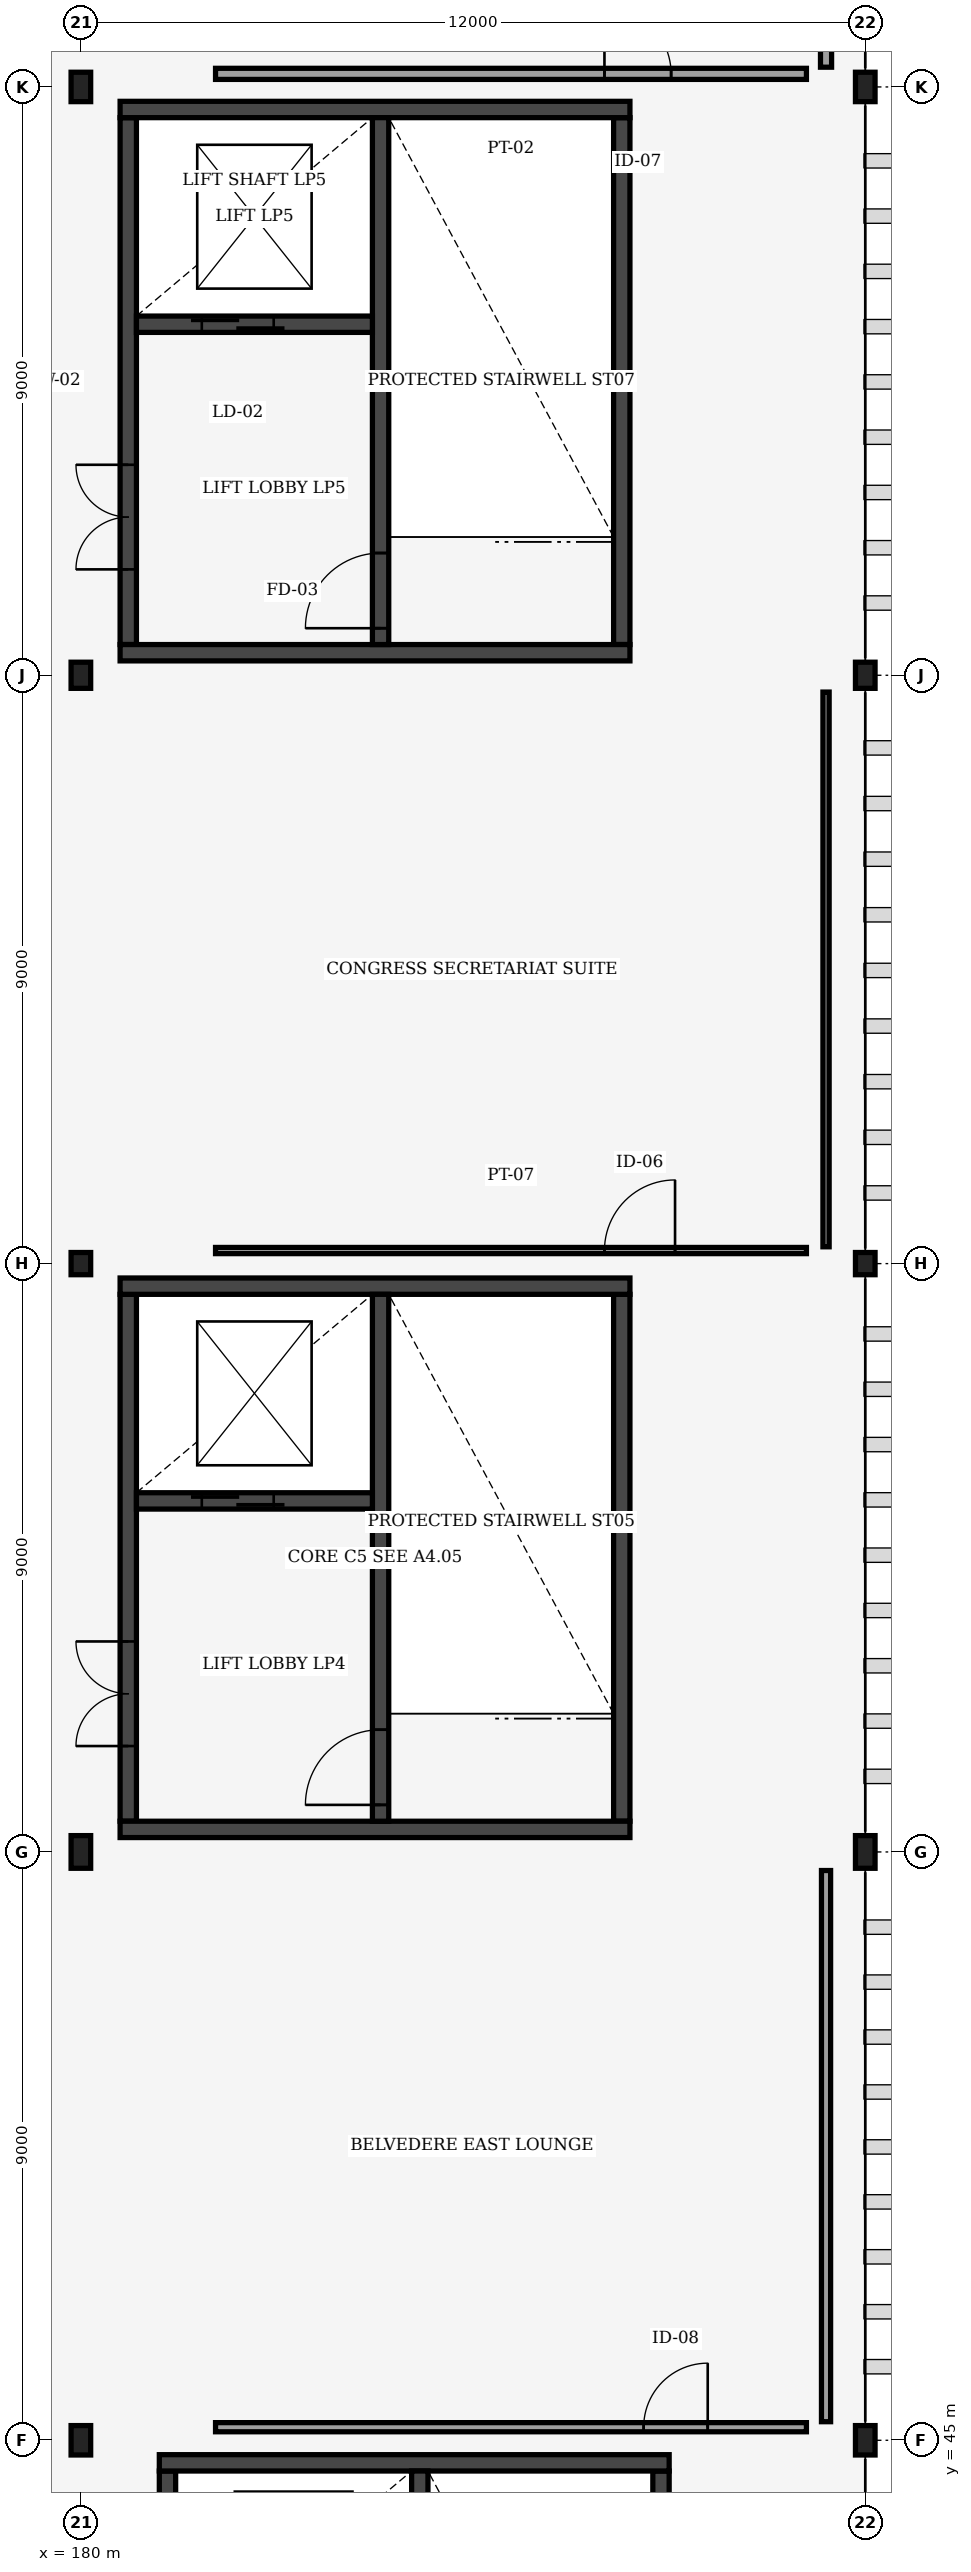
"""IFC4 building model, lengths in metres.
Left out: names, types, materials, properties, quantities, classifications, styles, units other than length and angle.
Written with IfcOpenShell. Run it as: python <this file> out.ifc"""

import sys

from ifc_helpers import new_model, si_unit, direction, frame, frame_2d, origin, origin_2d, place, context, subcontext, project, spatial, rectangle, i_section, extrude, element, fill, save


model = new_model("IFC4")
c1 = context("Model", 3, precision=1e-05, world=origin(), true_north=direction((0.0, 1.0)))
c2 = subcontext(c1, "Body", "Model", "MODEL_VIEW")
j1 = project(units=[si_unit("LENGTHUNIT", "METRE"), si_unit("PLANEANGLEUNIT", "RADIAN")], contexts=[c1])
p1 = place(None, origin())
s1 = spatial("IfcSite", under=j1, at=p1, CompositionType="ELEMENT")
p2 = place(p1, origin())
s2 = spatial("IfcBuilding", under=s1, at=p2, CompositionType="ELEMENT")
p3 = place(p2, frame((0.0, 0.0, 26.8)))
s3 = spatial("IfcBuildingStorey", under=s2, at=p3, CompositionType="ELEMENT", Elevation=26.8)
p4 = place(p3, frame((180.0, 45.0, 0.0), z_axis=(0.0, 0.0, 1.0), x_axis=(1.0, 0.0, 0.0)))
e1 = element("IfcColumn", 1, at=p4, inside=s3, PredefinedType="COLUMN", context=c2, shape_type="SweptSolid", body=[
    extrude(i_section(OverallWidth=0.3, OverallDepth=0.45, WebThickness=0.014, FlangeThickness=0.026, FilletRadius=0.027, at=origin_2d()), origin(), (0.0, 0.0, 1.0), 3.0),
])
p5 = place(p3, frame((180.0, 54.0, 0.0), z_axis=(0.0, 0.0, 1.0), x_axis=(1.0, 0.0, 0.0)))
e2 = element("IfcColumn", 2, at=p5, inside=s3, PredefinedType="COLUMN", context=c2, shape_type="SweptSolid", body=[
    extrude(i_section(OverallWidth=0.3, OverallDepth=0.5, WebThickness=0.014, FlangeThickness=0.028, FilletRadius=0.027, at=origin_2d()), origin(), (0.0, 0.0, 1.0), 3.0),
])
p6 = place(p3, frame((180.0, 63.0, 0.0), z_axis=(0.0, 0.0, 1.0), x_axis=(1.0, 0.0, 0.0)))
e3 = element("IfcColumn", 3, at=p6, inside=s3, PredefinedType="COLUMN", context=c2, shape_type="SweptSolid", body=[
    extrude(i_section(OverallWidth=0.3, OverallDepth=0.34, WebThickness=0.012, FlangeThickness=0.021, FilletRadius=0.027, at=origin_2d()), origin(), (0.0, 0.0, 1.0), 3.0),
])
p7 = place(p3, frame((180.0, 72.0, 0.0), z_axis=(0.0, 0.0, 1.0), x_axis=(1.0, 0.0, 0.0)))
e4 = element("IfcColumn", 4, at=p7, inside=s3, PredefinedType="COLUMN", context=c2, shape_type="SweptSolid", body=[
    extrude(i_section(OverallWidth=0.3, OverallDepth=0.4, WebThickness=0.013, FlangeThickness=0.024, FilletRadius=0.027, at=origin_2d()), origin(), (0.0, 0.0, 1.0), 3.0),
])
for number, where, z_axis, x_axis in (
    (5, (180.0, 81.0, 0.0), (0.0, 0.0, 1.0), (1.0, 0.0, 0.0)),
    (6, (192.0, 45.0, 0.0), (0.0, 0.0, 1.0), (1.0, 0.0, 0.0)),
):
    element("IfcColumn", number, at=place(p3, frame(where, z_axis=z_axis, x_axis=x_axis)), inside=s3, PredefinedType="COLUMN", context=c2, shape_type="SweptSolid", body=[
        extrude(i_section(OverallWidth=0.3, OverallDepth=0.45, WebThickness=0.014, FlangeThickness=0.026, FilletRadius=0.027, at=origin_2d()), origin(), (0.0, 0.0, 1.0), 3.0),
    ])
p8 = place(p3, frame((192.0, 54.0, 0.0), z_axis=(0.0, 0.0, 1.0), x_axis=(1.0, 0.0, 0.0)))
e7 = element("IfcColumn", 7, at=p8, inside=s3, PredefinedType="COLUMN", context=c2, shape_type="SweptSolid", body=[
    extrude(i_section(OverallWidth=0.3, OverallDepth=0.5, WebThickness=0.014, FlangeThickness=0.028, FilletRadius=0.027, at=origin_2d()), origin(), (0.0, 0.0, 1.0), 3.0),
])
p9 = place(p3, frame((192.0, 63.0, 0.0), z_axis=(0.0, 0.0, 1.0), x_axis=(1.0, 0.0, 0.0)))
e8 = element("IfcColumn", 8, at=p9, inside=s3, PredefinedType="COLUMN", context=c2, shape_type="SweptSolid", body=[
    extrude(i_section(OverallWidth=0.3, OverallDepth=0.34, WebThickness=0.012, FlangeThickness=0.021, FilletRadius=0.027, at=origin_2d()), origin(), (0.0, 0.0, 1.0), 3.0),
])
p10 = place(p3, frame((192.0, 72.0, 0.0), z_axis=(0.0, 0.0, 1.0), x_axis=(1.0, 0.0, 0.0)))
e9 = element("IfcColumn", 9, at=p10, inside=s3, PredefinedType="COLUMN", context=c2, shape_type="SweptSolid", body=[
    extrude(i_section(OverallWidth=0.3, OverallDepth=0.4, WebThickness=0.013, FlangeThickness=0.024, FilletRadius=0.027, at=origin_2d()), origin(), (0.0, 0.0, 1.0), 3.0),
])
p11 = place(p3, frame((192.0, 81.0, 0.0), z_axis=(0.0, 0.0, 1.0), x_axis=(1.0, 0.0, 0.0)))
e10 = element("IfcColumn", 10, at=p11, inside=s3, PredefinedType="COLUMN", context=c2, shape_type="SweptSolid", body=[
    extrude(i_section(OverallWidth=0.3, OverallDepth=0.45, WebThickness=0.014, FlangeThickness=0.026, FilletRadius=0.027, at=origin_2d()), origin(), (0.0, 0.0, 1.0), 3.0),
])
p12 = place(p3, frame((180.725, 54.47, 0.0), z_axis=(0.0, 0.0, 1.0), x_axis=(0.0, 1.0, 0.0)))
e11 = element("IfcWall", 11, at=p12, inside=s3, PredefinedType="SHEAR", context=c2, shape_type="SweptSolid", body=[
    extrude(rectangle(XDim=8.06, YDim=0.25, at=frame_2d((4.03, 0.0))), origin(), (0.0, 0.0, 1.0), 2.64),
])
p13 = place(p12, frame((1.15, 0.0, 0.0)))
e12 = element("IfcOpeningElement", 12, at=p13, cuts=e11, PredefinedType="OPENING", context=c2, shape_type="SweptSolid", body=[
    extrude(rectangle(XDim=1.6, YDim=2.2, at=frame_2d((0.8, 1.1))), frame((0.0, 0.135, 0.0), z_axis=(0.0, -1.0, 0.0), x_axis=(1.0, 0.0, 0.0)), (0.0, 0.0, 1.0), 0.27),
])
p14 = place(p3, frame((188.275, 54.47, 0.0), z_axis=(0.0, 0.0, 1.0), x_axis=(0.0, 1.0, 0.0)))
e13 = element("IfcWall", 13, at=p14, inside=s3, PredefinedType="SHEAR", context=c2, shape_type="SweptSolid", body=[
    extrude(rectangle(XDim=8.06, YDim=0.25, at=frame_2d((4.03, 0.0))), origin(), (0.0, 0.0, 1.0), 2.64),
])
for number, where, z_axis, x_axis in (
    (14, (180.6, 54.345, 0.0), (0.0, 0.0, 1.0), (1.0, 0.0, 0.0)),
    (15, (180.6, 62.655, 0.0), (0.0, 0.0, 1.0), (1.0, 0.0, 0.0)),
):
    element("IfcWall", number, at=place(p3, frame(where, z_axis=z_axis, x_axis=x_axis)), inside=s3, PredefinedType="SHEAR", context=c2, shape_type="SweptSolid", body=[
        extrude(rectangle(XDim=7.8, YDim=0.25, at=frame_2d((3.9, 0.0))), origin(), (0.0, 0.0, 1.0), 2.64),
    ])
p15 = place(p3, frame((184.585, 54.47, 0.0), z_axis=(0.0, 0.0, 1.0), x_axis=(0.0, 1.0, 0.0)))
e16 = element("IfcWall", 16, at=p15, inside=s3, PredefinedType="SHEAR", context=c2, shape_type="SweptSolid", body=[
    extrude(rectangle(XDim=8.06, YDim=0.25, at=frame_2d((4.03, 0.0))), origin(), (0.0, 0.0, 1.0), 2.64),
])
p16 = place(p15, frame((0.25, 0.0, 0.0)))
e17 = element("IfcOpeningElement", 17, at=p16, cuts=e16, PredefinedType="OPENING", context=c2, shape_type="SweptSolid", body=[
    extrude(rectangle(XDim=1.15, YDim=2.15, at=frame_2d((0.575, 1.075))), frame((0.0, 0.135, 0.0), z_axis=(0.0, -1.0, 0.0), x_axis=(1.0, 0.0, 0.0)), (0.0, 0.0, 1.0), 0.27),
])
p17 = place(p3, frame((180.85, 59.37, 0.0), z_axis=(0.0, 0.0, 1.0), x_axis=(1.0, 0.0, 0.0)))
e18 = element("IfcWall", 18, at=p17, inside=s3, PredefinedType="SHEAR", context=c2, shape_type="SweptSolid", body=[
    extrude(rectangle(XDim=3.61, YDim=0.25, at=frame_2d((1.805, 0.0))), origin(), (0.0, 0.0, 1.0), 2.64),
])
p18 = place(p17, frame((1.0, 0.0, 0.0)))
e19 = element("IfcOpeningElement", 19, at=p18, cuts=e18, PredefinedType="OPENING", context=c2, shape_type="SweptSolid", body=[
    extrude(rectangle(XDim=1.1, YDim=2.1, at=frame_2d((0.55, 1.05))), frame((0.0, 0.135, 0.0), z_axis=(0.0, -1.0, 0.0), x_axis=(1.0, 0.0, 0.0)), (0.0, 0.0, 1.0), 0.27),
])
p19 = place(p3, frame((181.325, 36.47, 0.0), z_axis=(0.0, 0.0, 1.0), x_axis=(0.0, 1.0, 0.0)))
e20 = element("IfcWall", 20, at=p19, inside=s3, PredefinedType="SHEAR", context=c2, shape_type="SweptSolid", body=[
    extrude(rectangle(XDim=8.06, YDim=0.25, at=frame_2d((4.03, 0.0))), origin(), (0.0, 0.0, 1.0), 2.64),
])
p20 = place(p19, frame((1.15, 0.0, 0.0)))
e21 = element("IfcOpeningElement", 21, at=p20, cuts=e20, PredefinedType="OPENING", context=c2, shape_type="SweptSolid", body=[
    extrude(rectangle(XDim=1.8, YDim=2.2, at=frame_2d((0.9, 1.1))), frame((0.0, 0.135, 0.0), z_axis=(0.0, -1.0, 0.0), x_axis=(1.0, 0.0, 0.0)), (0.0, 0.0, 1.0), 0.27),
])
p21 = place(p3, frame((188.875, 36.47, 0.0), z_axis=(0.0, 0.0, 1.0), x_axis=(0.0, 1.0, 0.0)))
e22 = element("IfcWall", 22, at=p21, inside=s3, PredefinedType="SHEAR", context=c2, shape_type="SweptSolid", body=[
    extrude(rectangle(XDim=8.06, YDim=0.25, at=frame_2d((4.03, 0.0))), origin(), (0.0, 0.0, 1.0), 2.64),
])
p22 = place(p3, frame((181.2, 44.655, 0.0), z_axis=(0.0, 0.0, 1.0), x_axis=(1.0, 0.0, 0.0)))
e23 = element("IfcWall", 23, at=p22, inside=s3, PredefinedType="SHEAR", context=c2, shape_type="SweptSolid", body=[
    extrude(rectangle(XDim=7.8, YDim=0.25, at=frame_2d((3.9, 0.0))), origin(), (0.0, 0.0, 1.0), 2.64),
])
p23 = place(p3, frame((185.185, 36.47, 0.0), z_axis=(0.0, 0.0, 1.0), x_axis=(0.0, 1.0, 0.0)))
e24 = element("IfcWall", 24, at=p23, inside=s3, PredefinedType="SHEAR", context=c2, shape_type="SweptSolid", body=[
    extrude(rectangle(XDim=8.06, YDim=0.25, at=frame_2d((4.03, 0.0))), origin(), (0.0, 0.0, 1.0), 2.64),
])
p24 = place(p23, frame((0.25, 0.0, 0.0)))
e25 = element("IfcOpeningElement", 25, at=p24, cuts=e24, PredefinedType="OPENING", context=c2, shape_type="SweptSolid", body=[
    extrude(rectangle(XDim=1.15, YDim=2.15, at=frame_2d((0.575, 1.075))), frame((0.0, 0.135, 0.0), z_axis=(0.0, -1.0, 0.0), x_axis=(1.0, 0.0, 0.0)), (0.0, 0.0, 1.0), 0.27),
])
p25 = place(p3, frame((180.725, 72.47, 0.0), z_axis=(0.0, 0.0, 1.0), x_axis=(0.0, 1.0, 0.0)))
e26 = element("IfcWall", 26, at=p25, inside=s3, PredefinedType="SHEAR", context=c2, shape_type="SweptSolid", body=[
    extrude(rectangle(XDim=8.06, YDim=0.25, at=frame_2d((4.03, 0.0))), origin(), (0.0, 0.0, 1.0), 2.64),
])
p26 = place(p25, frame((1.15, 0.0, 0.0)))
e27 = element("IfcOpeningElement", 27, at=p26, cuts=e26, PredefinedType="OPENING", context=c2, shape_type="SweptSolid", body=[
    extrude(rectangle(XDim=1.6, YDim=2.2, at=frame_2d((0.8, 1.1))), frame((0.0, 0.135, 0.0), z_axis=(0.0, -1.0, 0.0), x_axis=(1.0, 0.0, 0.0)), (0.0, 0.0, 1.0), 0.27),
])
p27 = place(p3, frame((188.275, 72.47, 0.0), z_axis=(0.0, 0.0, 1.0), x_axis=(0.0, 1.0, 0.0)))
e28 = element("IfcWall", 28, at=p27, inside=s3, PredefinedType="SHEAR", context=c2, shape_type="SweptSolid", body=[
    extrude(rectangle(XDim=8.06, YDim=0.25, at=frame_2d((4.03, 0.0))), origin(), (0.0, 0.0, 1.0), 2.64),
])
for number, where, z_axis, x_axis in (
    (29, (180.6, 72.345, 0.0), (0.0, 0.0, 1.0), (1.0, 0.0, 0.0)),
    (30, (180.6, 80.655, 0.0), (0.0, 0.0, 1.0), (1.0, 0.0, 0.0)),
):
    element("IfcWall", number, at=place(p3, frame(where, z_axis=z_axis, x_axis=x_axis)), inside=s3, PredefinedType="SHEAR", context=c2, shape_type="SweptSolid", body=[
        extrude(rectangle(XDim=7.8, YDim=0.25, at=frame_2d((3.9, 0.0))), origin(), (0.0, 0.0, 1.0), 2.64),
    ])
p28 = place(p3, frame((184.585, 72.47, 0.0), z_axis=(0.0, 0.0, 1.0), x_axis=(0.0, 1.0, 0.0)))
e31 = element("IfcWall", 31, at=p28, inside=s3, PredefinedType="SHEAR", context=c2, shape_type="SweptSolid", body=[
    extrude(rectangle(XDim=8.06, YDim=0.25, at=frame_2d((4.03, 0.0))), origin(), (0.0, 0.0, 1.0), 2.64),
])
p29 = place(p28, frame((0.25, 0.0, 0.0)))
e32 = element("IfcOpeningElement", 32, at=p29, cuts=e31, PredefinedType="OPENING", context=c2, shape_type="SweptSolid", body=[
    extrude(rectangle(XDim=1.15, YDim=2.15, at=frame_2d((0.575, 1.075))), frame((0.0, 0.135, 0.0), z_axis=(0.0, -1.0, 0.0), x_axis=(1.0, 0.0, 0.0)), (0.0, 0.0, 1.0), 0.27),
])
p30 = place(p3, frame((180.85, 77.37, 0.0), z_axis=(0.0, 0.0, 1.0), x_axis=(1.0, 0.0, 0.0)))
e33 = element("IfcWall", 33, at=p30, inside=s3, PredefinedType="SHEAR", context=c2, shape_type="SweptSolid", body=[
    extrude(rectangle(XDim=3.61, YDim=0.25, at=frame_2d((1.805, 0.0))), origin(), (0.0, 0.0, 1.0), 2.64),
])
p31 = place(p30, frame((1.0, 0.0, 0.0)))
e34 = element("IfcOpeningElement", 34, at=p31, cuts=e33, PredefinedType="OPENING", context=c2, shape_type="SweptSolid", body=[
    extrude(rectangle(XDim=1.1, YDim=2.1, at=frame_2d((0.55, 1.05))), frame((0.0, 0.135, 0.0), z_axis=(0.0, -1.0, 0.0), x_axis=(1.0, 0.0, 0.0)), (0.0, 0.0, 1.0), 0.27),
])
p32 = place(p3, frame((182.06, 63.2, 0.0), z_axis=(0.0, 0.0, 1.0), x_axis=(1.0, 0.0, 0.0)))
e35 = element("IfcWall", 35, at=p32, inside=s3, PredefinedType="PARTITIONING", context=c2, shape_type="SweptSolid", body=[
    extrude(rectangle(XDim=9.04, YDim=0.095, at=frame_2d((4.52, 0.0))), origin(), (0.0, 0.0, 1.0), 2.35),
])
p33 = place(p32, frame((5.95, 0.0, 0.0)))
e36 = element("IfcOpeningElement", 36, at=p33, cuts=e35, PredefinedType="OPENING", context=c2, shape_type="SweptSolid", body=[
    extrude(rectangle(XDim=1.08, YDim=2.18, at=frame_2d((0.54, 1.09))), frame((0.0, 0.057, 0.0), z_axis=(0.0, -1.0, 0.0), x_axis=(1.0, 0.0, 0.0)), (0.0, 0.0, 1.0), 0.115),
])
p34 = place(p3, frame((191.4, 63.257, 0.0), z_axis=(0.0, 0.0, 1.0), x_axis=(0.0, 1.0, 0.0)))
e37 = element("IfcWall", 37, at=p34, inside=s3, PredefinedType="PARTITIONING", context=c2, shape_type="SweptSolid", body=[
    extrude(rectangle(XDim=8.486, YDim=0.095, at=frame_2d((4.243, 0.0))), origin(), (0.0, 0.0, 1.0), 2.35),
])
p35 = place(p3, frame((182.06, 81.2, 0.0), z_axis=(0.0, 0.0, 1.0), x_axis=(1.0, 0.0, 0.0)))
e38 = element("IfcWall", 38, at=p35, inside=s3, PredefinedType="PARTITIONING", context=c2, shape_type="SweptSolid", body=[
    extrude(rectangle(XDim=9.04, YDim=0.17, at=frame_2d((4.52, 0.0))), origin(), (0.0, 0.0, 1.0), 2.35),
])
p36 = place(p35, frame((5.95, 0.0, 0.0)))
e39 = element("IfcOpeningElement", 39, at=p36, cuts=e38, PredefinedType="OPENING", context=c2, shape_type="SweptSolid", body=[
    extrude(rectangle(XDim=1.02, YDim=2.15, at=frame_2d((0.51, 1.075))), frame((0.0, 0.095, 0.0), z_axis=(0.0, -1.0, 0.0), x_axis=(1.0, 0.0, 0.0)), (0.0, 0.0, 1.0), 0.19),
])
p37 = place(p3, frame((191.4, 81.302, 0.0), z_axis=(0.0, 0.0, 1.0), x_axis=(0.0, 1.0, 0.0)))
e40 = element("IfcWall", 40, at=p37, inside=s3, PredefinedType="PARTITIONING", context=c2, shape_type="SweptSolid", body=[
    extrude(rectangle(XDim=8.396, YDim=0.17, at=frame_2d((4.198, 0.0))), origin(), (0.0, 0.0, 1.0), 2.35),
])
p38 = place(p3, frame((182.06, 45.2, 0.0), z_axis=(0.0, 0.0, 1.0), x_axis=(1.0, 0.0, 0.0)))
e41 = element("IfcWall", 41, at=p38, inside=s3, PredefinedType="PARTITIONING", context=c2, shape_type="SweptSolid", body=[
    extrude(rectangle(XDim=9.04, YDim=0.14, at=frame_2d((4.52, 0.0))), origin(), (0.0, 0.0, 1.0), 2.35),
])
p39 = place(p38, frame((6.55, 0.0, 0.0)))
e42 = element("IfcOpeningElement", 42, at=p39, cuts=e41, PredefinedType="OPENING", context=c2, shape_type="SweptSolid", body=[
    extrude(rectangle(XDim=0.98, YDim=2.12, at=frame_2d((0.49, 1.06))), frame((0.0, 0.08, 0.0), z_axis=(0.0, -1.0, 0.0), x_axis=(1.0, 0.0, 0.0)), (0.0, 0.0, 1.0), 0.16),
])
p40 = place(p3, frame((191.4, 45.284, 0.0), z_axis=(0.0, 0.0, 1.0), x_axis=(0.0, 1.0, 0.0)))
e43 = element("IfcWall", 43, at=p40, inside=s3, PredefinedType="PARTITIONING", context=c2, shape_type="SweptSolid", body=[
    extrude(rectangle(XDim=8.432, YDim=0.14, at=frame_2d((4.216, 0.0))), origin(), (0.0, 0.0, 1.0), 2.35),
])
p41 = place(p16, origin())
e44 = element("IfcDoor", 44, at=p41, inside=s3, OperationType="SINGLE_SWING_LEFT", PredefinedType="DOOR", context=c2, shape_type="SweptSolid", body=[
    extrude(rectangle(XDim=1.15, YDim=2.15, at=frame_2d((0.575, 1.075))), frame((0.0, 0.025, 0.0), z_axis=(0.0, -1.0, 0.0), x_axis=(1.0, 0.0, 0.0)), (0.0, 0.0, 1.0), 0.05),
])
fill(e17, e44)
p42 = place(p18, origin())
e45 = element("IfcDoor", 45, at=p42, inside=s3, OperationType="DOUBLE_DOOR_SLIDING", PredefinedType="DOOR", context=c2, shape_type="SweptSolid", body=[
    extrude(rectangle(XDim=1.1, YDim=2.1, at=frame_2d((0.55, 1.05))), frame((0.0, 0.025, 0.0), z_axis=(0.0, -1.0, 0.0), x_axis=(1.0, 0.0, 0.0)), (0.0, 0.0, 1.0), 0.05),
])
fill(e19, e45)
p43 = place(p13, origin())
e46 = element("IfcDoor", 46, at=p43, inside=s3, OperationType="DOUBLE_DOOR_SINGLE_SWING", PredefinedType="DOOR", context=c2, shape_type="SweptSolid", body=[
    extrude(rectangle(XDim=1.6, YDim=2.2, at=frame_2d((0.8, 1.1))), frame((0.0, 0.025, 0.0), z_axis=(0.0, -1.0, 0.0), x_axis=(1.0, 0.0, 0.0)), (0.0, 0.0, 1.0), 0.05),
])
fill(e12, e46)
p44 = place(p29, origin())
e47 = element("IfcDoor", 47, at=p44, inside=s3, OperationType="SINGLE_SWING_LEFT", PredefinedType="DOOR", context=c2, shape_type="SweptSolid", body=[
    extrude(rectangle(XDim=1.15, YDim=2.15, at=frame_2d((0.575, 1.075))), frame((0.0, 0.025, 0.0), z_axis=(0.0, -1.0, 0.0), x_axis=(1.0, 0.0, 0.0)), (0.0, 0.0, 1.0), 0.05),
])
fill(e32, e47)
p45 = place(p31, origin())
e48 = element("IfcDoor", 48, at=p45, inside=s3, OperationType="DOUBLE_DOOR_SLIDING", PredefinedType="DOOR", context=c2, shape_type="SweptSolid", body=[
    extrude(rectangle(XDim=1.1, YDim=2.1, at=frame_2d((0.55, 1.05))), frame((0.0, 0.025, 0.0), z_axis=(0.0, -1.0, 0.0), x_axis=(1.0, 0.0, 0.0)), (0.0, 0.0, 1.0), 0.05),
])
fill(e34, e48)
p46 = place(p26, origin())
e49 = element("IfcDoor", 49, at=p46, inside=s3, OperationType="DOUBLE_DOOR_SINGLE_SWING", PredefinedType="DOOR", context=c2, shape_type="SweptSolid", body=[
    extrude(rectangle(XDim=1.6, YDim=2.2, at=frame_2d((0.8, 1.1))), frame((0.0, 0.025, 0.0), z_axis=(0.0, -1.0, 0.0), x_axis=(1.0, 0.0, 0.0)), (0.0, 0.0, 1.0), 0.05),
])
fill(e27, e49)
p47 = place(p33, origin())
e50 = element("IfcDoor", 50, at=p47, inside=s3, OperationType="SINGLE_SWING_RIGHT", PredefinedType="DOOR", context=c2, shape_type="SweptSolid", body=[
    extrude(rectangle(XDim=1.08, YDim=2.18, at=frame_2d((0.54, 1.09))), frame((0.0, 0.025, 0.0), z_axis=(0.0, -1.0, 0.0), x_axis=(1.0, 0.0, 0.0)), (0.0, 0.0, 1.0), 0.05),
])
fill(e36, e50)
p48 = place(p36, origin())
e51 = element("IfcDoor", 51, at=p48, inside=s3, OperationType="SINGLE_SWING_LEFT", PredefinedType="DOOR", context=c2, shape_type="SweptSolid", body=[
    extrude(rectangle(XDim=1.02, YDim=2.15, at=frame_2d((0.51, 1.075))), frame((0.0, 0.025, 0.0), z_axis=(0.0, -1.0, 0.0), x_axis=(1.0, 0.0, 0.0)), (0.0, 0.0, 1.0), 0.05),
])
fill(e39, e51)
p49 = place(p39, origin())
e52 = element("IfcDoor", 52, at=p49, inside=s3, OperationType="SINGLE_SWING_RIGHT", PredefinedType="DOOR", context=c2, shape_type="SweptSolid", body=[
    extrude(rectangle(XDim=0.98, YDim=2.12, at=frame_2d((0.49, 1.06))), frame((0.0, 0.025, 0.0), z_axis=(0.0, -1.0, 0.0), x_axis=(1.0, 0.0, 0.0)), (0.0, 0.0, 1.0), 0.05),
])
fill(e42, e52)
save(model, sys.argv[1])
